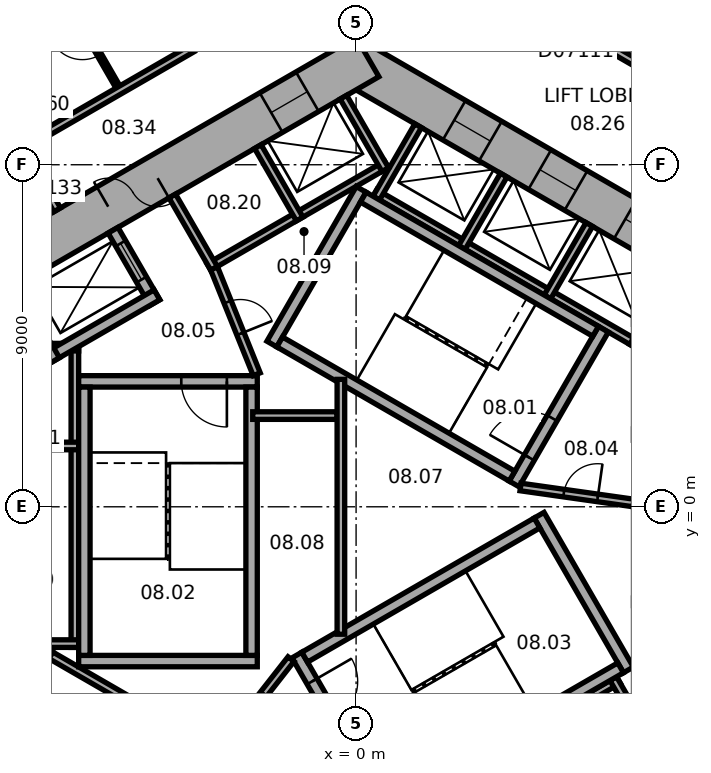
"""IFC4 building model, lengths in metres.
Left out: names, types, materials, properties, quantities, classifications, styles, units other than length and angle.
Written with IfcOpenShell. Run it as: python <this file> out.ifc"""

import sys

from ifc_helpers import new_model, si_unit, direction, frame, frame_2d, origin, place, context, subcontext, project, spatial, rectangle, extrude, element, fill, save


model = new_model("IFC4")
c1 = context("Model", 3, precision=1e-05, world=origin(), true_north=direction((0.0, 1.0)))
c2 = subcontext(c1, "Body", "Model", "MODEL_VIEW")
j1 = project(units=[si_unit("LENGTHUNIT", "METRE"), si_unit("PLANEANGLEUNIT", "RADIAN")], contexts=[c1])
p1 = place(None, origin())
s1 = spatial("IfcSite", under=j1, at=p1, CompositionType="ELEMENT")
p2 = place(p1, origin())
s2 = spatial("IfcBuilding", under=s1, at=p2, CompositionType="ELEMENT")
p3 = place(p2, frame((0.0, 0.0, 47.3)))
s3 = spatial("IfcBuildingStorey", under=s2, at=p3, CompositionType="ELEMENT", Elevation=47.3)
p4 = place(p3, frame((10.4, 5.658, 0.0), z_axis=(0.0, 0.0, 1.0), x_axis=(-0.866021384402, 0.500006961711, 0.0)))
e1 = element("IfcWall", 1, at=p4, inside=s3, PredefinedType="SHEAR", context=c2, shape_type="SweptSolid", body=[
    extrude(rectangle(XDim=12.355, YDim=1.2, at=frame_2d((6.178, 0.0))), origin(), (0.0, 0.0, 1.0), 3.3),
])
p5 = place(p4, frame((2.728, 0.0, 0.0)))
e2 = element("IfcOpeningElement", 2, at=p5, cuts=e1, PredefinedType="OPENING", context=c2, shape_type="SweptSolid", body=[
    extrude(rectangle(XDim=1.1, YDim=2.1, at=frame_2d((0.55, 1.05))), frame((0.0, 0.61, 0.0), z_axis=(0.0, -1.0, 0.0), x_axis=(1.0, 0.0, 0.0)), (0.0, 0.0, 1.0), 1.22),
])
p6 = place(p4, frame((5.328, 0.0, 0.0)))
e3 = element("IfcOpeningElement", 3, at=p6, cuts=e1, PredefinedType="OPENING", context=c2, shape_type="SweptSolid", body=[
    extrude(rectangle(XDim=1.1, YDim=2.1, at=frame_2d((0.55, 1.05))), frame((0.0, 0.61, 0.0), z_axis=(0.0, -1.0, 0.0), x_axis=(1.0, 0.0, 0.0)), (0.0, 0.0, 1.0), 1.22),
])
p7 = place(p4, frame((7.928, 0.0, 0.0)))
e4 = element("IfcOpeningElement", 4, at=p7, cuts=e1, PredefinedType="OPENING", context=c2, shape_type="SweptSolid", body=[
    extrude(rectangle(XDim=1.1, YDim=2.1, at=frame_2d((0.55, 1.05))), frame((0.0, 0.61, 0.0), z_axis=(0.0, -1.0, 0.0), x_axis=(1.0, 0.0, 0.0)), (0.0, 0.0, 1.0), 1.22),
])
p8 = place(p3, frame((0.3, 11.836, 0.0), z_axis=(0.0, 0.0, 1.0), x_axis=(-0.866021384402, -0.500006961711, 0.0)))
e5 = element("IfcWall", 5, at=p8, inside=s3, PredefinedType="SHEAR", context=c2, shape_type="SweptSolid", body=[
    extrude(rectangle(XDim=12.355, YDim=1.2, at=frame_2d((6.178, 0.0))), origin(), (0.0, 0.0, 1.0), 3.3),
])
p9 = place(p8, frame((6.378, 0.0, 0.0)))
e6 = element("IfcOpeningElement", 6, at=p9, cuts=e5, PredefinedType="OPENING", context=c2, shape_type="SweptSolid", body=[
    extrude(rectangle(XDim=1.5, YDim=2.1, at=frame_2d((0.75, 1.05))), frame((0.0, 0.61, 0.0), z_axis=(0.0, -1.0, 0.0), x_axis=(1.0, 0.0, 0.0)), (0.0, 0.0, 1.0), 1.22),
])
p10 = place(p8, frame((1.828, 0.0, 0.0)))
e7 = element("IfcOpeningElement", 7, at=p10, cuts=e5, PredefinedType="OPENING", context=c2, shape_type="SweptSolid", body=[
    extrude(rectangle(XDim=1.1, YDim=2.1, at=frame_2d((0.55, 1.05))), frame((0.0, 0.61, 0.0), z_axis=(0.0, -1.0, 0.0), x_axis=(1.0, 0.0, 0.0)), (0.0, 0.0, 1.0), 1.22),
])
p11 = place(p3, frame((7.424, 4.259, 0.0), z_axis=(0.0, 0.0, 1.0), x_axis=(-0.866026010844, 0.49999894854, 0.0)))
e8 = element("IfcWall", 8, at=p11, inside=s3, PredefinedType="PARTITIONING", context=c2, shape_type="SweptSolid", body=[
    extrude(rectangle(XDim=8.0, YDim=0.2, at=frame_2d((4.0, 0.0))), origin(), (0.0, 0.0, 1.0), 3.05),
])
for number, where, z_axis, x_axis in (
    (9, (7.287, 4.222, 0.0), (0.0, 0.0, 1.0), (0.5, 0.866, 0.0)),
    (10, (5.036, 5.522, 0.0), (0.0, 0.0, 1.0), (0.5, 0.866, 0.0)),
    (11, (2.784, 6.822, 0.0), (0.0, 0.0, 1.0), (0.5, 0.866, 0.0)),
    (12, (0.532, 8.122, 0.0), (0.0, 0.0, 1.0), (0.5, 0.866, 0.0)),
):
    element("IfcWall", number, at=place(p3, frame(where, z_axis=z_axis, x_axis=x_axis)), inside=s3, PredefinedType="PARTITIONING", context=c2, shape_type="SweptSolid", body=[
        extrude(rectangle(XDim=2.2, YDim=0.2, at=frame_2d((1.1, 0.0))), origin(), (0.0, 0.0, 1.0), 3.05),
    ])
p12 = place(p3, frame((0.803, 9.009, 0.0), z_axis=(0.0, 0.0, 1.0), x_axis=(-0.866028230842, -0.499995103361, 0.0)))
e13 = element("IfcWall", 13, at=p12, inside=s3, PredefinedType="PARTITIONING", context=c2, shape_type="SweptSolid", body=[
    extrude(rectangle(XDim=5.4, YDim=0.2, at=frame_2d((2.7, 0.0))), origin(), (0.0, 0.0, 1.0), 3.05),
])
p13 = place(p3, frame((0.767, 8.872, 0.0), z_axis=(0.0, 0.0, 1.0), x_axis=(-0.499994660107, 0.866028486751, 0.0)))
e14 = element("IfcWall", 14, at=p13, inside=s3, PredefinedType="PARTITIONING", context=c2, shape_type="SweptSolid", body=[
    extrude(rectangle(XDim=2.2, YDim=0.2, at=frame_2d((1.1, 0.0))), origin(), (0.0, 0.0, 1.0), 3.05),
])
for number, where, z_axis, x_axis in (
    (15, (-1.485, 7.572, 0.0), (0.0, 0.0, 1.0), (-0.5, 0.866, 0.0)),
    (16, (-3.737, 6.272, 0.0), (0.0, 0.0, 1.0), (-0.5, 0.866, 0.0)),
):
    element("IfcWall", number, at=place(p3, frame(where, z_axis=z_axis, x_axis=x_axis)), inside=s3, PredefinedType="PARTITIONING", context=c2, shape_type="SweptSolid", body=[
        extrude(rectangle(XDim=2.2, YDim=0.2, at=frame_2d((1.1, 0.0))), origin(), (0.0, 0.0, 1.0), 3.05),
    ])
p14 = place(p3, frame((-7.4, 4.3, 0.0), z_axis=(0.0, 0.0, 1.0), x_axis=(0.0, -1.0, 0.0)))
e17 = element("IfcWall", 17, at=p14, inside=s3, PredefinedType="PARTITIONING", context=c2, shape_type="SweptSolid", body=[
    extrude(rectangle(XDim=8.0, YDim=0.2, at=frame_2d((4.0, 0.0))), origin(), (0.0, 0.0, 1.0), 3.05),
])
for number, where, z_axis, x_axis in (
    (18, (-7.3, 4.2, 0.0), (0.0, 0.0, 1.0), (-1.0, 0.0, 0.0)),
    (19, (-7.3, 1.6, 0.0), (0.0, 0.0, 1.0), (-1.0, 0.0, 0.0)),
    (20, (-7.3, -3.6, 0.0), (0.0, 0.0, 1.0), (-1.0, 0.0, 0.0)),
):
    element("IfcWall", number, at=place(p3, frame(where, z_axis=z_axis, x_axis=x_axis)), inside=s3, PredefinedType="PARTITIONING", context=c2, shape_type="SweptSolid", body=[
        extrude(rectangle(XDim=2.2, YDim=0.2, at=frame_2d((1.1, 0.0))), origin(), (0.0, 0.0, 1.0), 3.05),
    ])
p15 = place(p3, frame((-8.203, -3.809, 0.0), z_axis=(0.0, 0.0, 1.0), x_axis=(0.866028230842, -0.499995103361, 0.0)))
e21 = element("IfcWall", 21, at=p15, inside=s3, PredefinedType="PARTITIONING", context=c2, shape_type="SweptSolid", body=[
    extrude(rectangle(XDim=5.4, YDim=0.2, at=frame_2d((2.7, 0.0))), origin(), (0.0, 0.0, 1.0), 3.05),
])
p16 = place(p3, frame((-8.067, -3.772, 0.0), z_axis=(0.0, 0.0, 1.0), x_axis=(-0.50002983664, -0.866008176907, 0.0)))
e22 = element("IfcWall", 22, at=p16, inside=s3, PredefinedType="PARTITIONING", context=c2, shape_type="SweptSolid", body=[
    extrude(rectangle(XDim=2.2, YDim=0.2, at=frame_2d((1.1, 0.0))), origin(), (0.0, 0.0, 1.0), 3.05),
])
p17 = place(p3, frame((-0.024, -8.559, 0.0), z_axis=(0.0, 0.0, 1.0), x_axis=(0.866026010844, 0.49999894854, 0.0)))
e23 = element("IfcWall", 23, at=p17, inside=s3, PredefinedType="PARTITIONING", context=c2, shape_type="SweptSolid", body=[
    extrude(rectangle(XDim=8.0, YDim=0.2, at=frame_2d((4.0, 0.0))), origin(), (0.0, 0.0, 1.0), 3.05),
])
p18 = place(p3, frame((6.768, -4.522, 0.0), z_axis=(0.0, 0.0, 1.0), x_axis=(0.50002983664, -0.866008176907, 0.0)))
e24 = element("IfcWall", 24, at=p18, inside=s3, PredefinedType="PARTITIONING", context=c2, shape_type="SweptSolid", body=[
    extrude(rectangle(XDim=2.2, YDim=0.2, at=frame_2d((1.1, 0.0))), origin(), (0.0, 0.0, 1.0), 3.05),
])
p19 = place(p3, frame((4.158, 0.602, 0.0), z_axis=(0.0, 0.0, 1.0), x_axis=(0.499977259774, 0.866038532462, 0.0)))
e25 = element("IfcWall", 25, at=p19, inside=s3, PredefinedType="SHEAR", context=c2, shape_type="SweptSolid", body=[
    extrude(rectangle(XDim=4.7, YDim=0.3, at=frame_2d((2.35, 0.0))), origin(), (0.0, 0.0, 1.0), 3.05),
])
p20 = place(p19, frame((0.8, 0.0, 0.0)))
e26 = element("IfcOpeningElement", 26, at=p20, cuts=e25, PredefinedType="OPENING", context=c2, shape_type="SweptSolid", body=[
    extrude(rectangle(XDim=1.2, YDim=2.1, at=frame_2d((0.6, 1.05))), frame((0.0, 0.16, 0.0), z_axis=(0.0, -1.0, 0.0), x_axis=(1.0, 0.0, 0.0)), (0.0, 0.0, 1.0), 0.32),
])
p21 = place(p3, frame((-2.216, 4.282, 0.0), z_axis=(0.0, 0.0, 1.0), x_axis=(0.499977259774, 0.866038532462, 0.0)))
e27 = element("IfcWall", 27, at=p21, inside=s3, PredefinedType="SHEAR", context=c2, shape_type="SweptSolid", body=[
    extrude(rectangle(XDim=4.7, YDim=0.3, at=frame_2d((2.35, 0.0))), origin(), (0.0, 0.0, 1.0), 3.05),
])
for number, where, z_axis, x_axis in (
    (28, (4.103, 0.807, 0.0), (0.0, 0.0, 1.0), (-0.866, 0.5, 0.0)),
    (29, (6.303, 4.617, 0.0), (0.0, 0.0, 1.0), (-0.866, 0.5, 0.0)),
):
    element("IfcWall", number, at=place(p3, frame(where, z_axis=z_axis, x_axis=x_axis)), inside=s3, PredefinedType="SHEAR", context=c2, shape_type="SweptSolid", body=[
        extrude(rectangle(XDim=7.06, YDim=0.3, at=frame_2d((3.53, 0.0))), origin(), (0.0, 0.0, 1.0), 3.05),
    ])
p22 = place(p3, frame((-2.6, 3.3, 0.0), z_axis=(0.0, 0.0, 1.0), x_axis=(-1.0, 0.0, 0.0)))
e30 = element("IfcWall", 30, at=p22, inside=s3, PredefinedType="SHEAR", context=c2, shape_type="SweptSolid", body=[
    extrude(rectangle(XDim=4.7, YDim=0.3, at=frame_2d((2.35, 0.0))), origin(), (0.0, 0.0, 1.0), 3.05),
])
p23 = place(p22, frame((0.8, 0.0, 0.0)))
e31 = element("IfcOpeningElement", 31, at=p23, cuts=e30, PredefinedType="OPENING", context=c2, shape_type="SweptSolid", body=[
    extrude(rectangle(XDim=1.2, YDim=2.1, at=frame_2d((0.6, 1.05))), frame((0.0, 0.16, 0.0), z_axis=(0.0, -1.0, 0.0), x_axis=(1.0, 0.0, 0.0)), (0.0, 0.0, 1.0), 0.32),
])
p24 = place(p3, frame((-2.6, -4.06, 0.0), z_axis=(0.0, 0.0, 1.0), x_axis=(-1.0, 0.0, 0.0)))
e32 = element("IfcWall", 32, at=p24, inside=s3, PredefinedType="SHEAR", context=c2, shape_type="SweptSolid", body=[
    extrude(rectangle(XDim=4.7, YDim=0.3, at=frame_2d((2.35, 0.0))), origin(), (0.0, 0.0, 1.0), 3.05),
])
for number, where, z_axis, x_axis in (
    (33, (-2.75, 3.15, 0.0), (0.0, 0.0, 1.0), (0.0, -1.0, 0.0)),
    (34, (-7.15, 3.15, 0.0), (0.0, 0.0, 1.0), (0.0, -1.0, 0.0)),
):
    element("IfcWall", number, at=place(p3, frame(where, z_axis=z_axis, x_axis=x_axis)), inside=s3, PredefinedType="SHEAR", context=c2, shape_type="SweptSolid", body=[
        extrude(rectangle(XDim=7.06, YDim=0.3, at=frame_2d((3.53, 0.0))), origin(), (0.0, 0.0, 1.0), 3.05),
    ])
p25 = place(p3, frame((-1.558, -3.902, 0.0), z_axis=(0.0, 0.0, 1.0), x_axis=(0.499977259774, -0.866038532462, 0.0)))
e35 = element("IfcWall", 35, at=p25, inside=s3, PredefinedType="SHEAR", context=c2, shape_type="SweptSolid", body=[
    extrude(rectangle(XDim=4.7, YDim=0.3, at=frame_2d((2.35, 0.0))), origin(), (0.0, 0.0, 1.0), 3.05),
])
p26 = place(p25, frame((0.8, 0.0, 0.0)))
e36 = element("IfcOpeningElement", 36, at=p26, cuts=e35, PredefinedType="OPENING", context=c2, shape_type="SweptSolid", body=[
    extrude(rectangle(XDim=1.2, YDim=2.1, at=frame_2d((0.6, 1.05))), frame((0.0, 0.16, 0.0), z_axis=(0.0, -1.0, 0.0), x_axis=(1.0, 0.0, 0.0)), (0.0, 0.0, 1.0), 0.32),
])
p27 = place(p3, frame((4.816, -0.222, 0.0), z_axis=(0.0, 0.0, 1.0), x_axis=(0.499977259774, -0.866038532462, 0.0)))
e37 = element("IfcWall", 37, at=p27, inside=s3, PredefinedType="SHEAR", context=c2, shape_type="SweptSolid", body=[
    extrude(rectangle(XDim=4.7, YDim=0.3, at=frame_2d((2.35, 0.0))), origin(), (0.0, 0.0, 1.0), 3.05),
])
for number, where, z_axis, x_axis in (
    (38, (-1.353, -3.957, 0.0), (0.0, 0.0, 1.0), (0.866, 0.5, 0.0)),
    (39, (0.847, -7.767, 0.0), (0.0, 0.0, 1.0), (0.866, 0.5, 0.0)),
):
    element("IfcWall", number, at=place(p3, frame(where, z_axis=z_axis, x_axis=x_axis)), inside=s3, PredefinedType="SHEAR", context=c2, shape_type="SweptSolid", body=[
        extrude(rectangle(XDim=7.06, YDim=0.3, at=frame_2d((3.53, 0.0))), origin(), (0.0, 0.0, 1.0), 3.05),
    ])
p28 = place(p3, frame((4.327, 0.521, 0.0), z_axis=(0.0, 0.0, 1.0), x_axis=(0.990124376366, -0.14019172346, 0.0)))
e40 = element("IfcWall", 40, at=p28, inside=s3, PredefinedType="PARTITIONING", context=c2, shape_type="SweptSolid", body=[
    extrude(rectangle(XDim=3.002, YDim=0.2, at=frame_2d((1.501, 0.0))), origin(), (0.0, 0.0, 1.0), 3.05),
])
p29 = place(p28, frame((1.15, 0.0, 0.0)))
e41 = element("IfcOpeningElement", 41, at=p29, cuts=e40, PredefinedType="OPENING", context=c2, shape_type="SweptSolid", body=[
    extrude(rectangle(XDim=0.9, YDim=2.1, at=frame_2d((0.45, 1.05))), frame((0.0, 0.11, 0.0), z_axis=(0.0, -1.0, 0.0), x_axis=(1.0, 0.0, 0.0)), (0.0, 0.0, 1.0), 0.22),
])
p30 = place(p3, frame((-5.295, 5.372, 0.0), z_axis=(0.0, 0.0, 1.0), x_axis=(-0.500077893725, 0.86598042715, 0.0)))
e42 = element("IfcWall", 42, at=p30, inside=s3, PredefinedType="SHEAR", context=c2, shape_type="SweptSolid", body=[
    extrude(rectangle(XDim=2.2, YDim=0.3, at=frame_2d((1.1, 0.0))), origin(), (0.0, 0.0, 1.0), 3.05),
])
p31 = place(p30, frame((0.7, 0.0, 0.0)))
e43 = element("IfcOpeningElement", 43, at=p31, cuts=e42, PredefinedType="OPENING", context=c2, shape_type="SweptSolid", body=[
    extrude(rectangle(XDim=1.1, YDim=2.1, at=frame_2d((0.55, 1.05))), frame((0.0, 0.16, 0.0), z_axis=(0.0, -1.0, 0.0), x_axis=(1.0, 0.0, 0.0)), (0.0, 0.0, 1.0), 0.32),
])
p32 = place(p3, frame((-5.24, 5.577, 0.0), z_axis=(0.0, 0.0, 1.0), x_axis=(-0.866014461049, -0.500018952895, 0.0)))
e44 = element("IfcWall", 44, at=p32, inside=s3, PredefinedType="SHEAR", context=c2, shape_type="SweptSolid", body=[
    extrude(rectangle(XDim=3.35, YDim=0.3, at=frame_2d((1.675, 0.0))), origin(), (0.0, 0.0, 1.0), 3.05),
])
p33 = place(p3, frame((-7.937, 3.847, 0.0), z_axis=(0.0, 0.0, 1.0), x_axis=(-0.50002983664, 0.866008176907, 0.0)))
e45 = element("IfcWall", 45, at=p33, inside=s3, PredefinedType="SHEAR", context=c2, shape_type="SweptSolid", body=[
    extrude(rectangle(XDim=2.2, YDim=0.3, at=frame_2d((1.1, 0.0))), origin(), (0.0, 0.0, 1.0), 3.05),
])
p34 = place(p3, frame((-2.615, 3.487, 0.0), z_axis=(0.0, 0.0, 1.0), x_axis=(-0.373576831041, 0.92759924068, 0.0)))
e46 = element("IfcWall", 46, at=p34, inside=s3, PredefinedType="PARTITIONING", context=c2, shape_type="SweptSolid", body=[
    extrude(rectangle(XDim=3.002, YDim=0.2, at=frame_2d((1.501, 0.0))), origin(), (0.0, 0.0, 1.0), 3.05),
])
p35 = place(p34, frame((1.15, 0.0, 0.0)))
e47 = element("IfcOpeningElement", 47, at=p35, cuts=e46, PredefinedType="OPENING", context=c2, shape_type="SweptSolid", body=[
    extrude(rectangle(XDim=0.9, YDim=2.1, at=frame_2d((0.45, 1.05))), frame((0.0, 0.11, 0.0), z_axis=(0.0, -1.0, 0.0), x_axis=(1.0, 0.0, 0.0)), (0.0, 0.0, 1.0), 0.22),
])
p36 = place(p3, frame((-1.712, -4.008, 0.0), z_axis=(0.0, 0.0, 1.0), x_axis=(-0.616549420702, -0.787316208287, 0.0)))
e48 = element("IfcWall", 48, at=p36, inside=s3, PredefinedType="PARTITIONING", context=c2, shape_type="SweptSolid", body=[
    extrude(rectangle(XDim=3.002, YDim=0.2, at=frame_2d((1.501, 0.0))), origin(), (0.0, 0.0, 1.0), 3.05),
])
p37 = place(p36, frame((1.15, 0.0, 0.0)))
e49 = element("IfcOpeningElement", 49, at=p37, cuts=e48, PredefinedType="OPENING", context=c2, shape_type="SweptSolid", body=[
    extrude(rectangle(XDim=0.9, YDim=2.1, at=frame_2d((0.45, 1.05))), frame((0.0, 0.11, 0.0), z_axis=(0.0, -1.0, 0.0), x_axis=(1.0, 0.0, 0.0)), (0.0, 0.0, 1.0), 0.22),
])
p38 = place(p3, frame((-2.72, 2.4, 0.0), z_axis=(0.0, 0.0, 1.0), x_axis=(1.0, 0.0, 0.0)))
e50 = element("IfcWall", 50, at=p38, inside=s3, PredefinedType="PARTITIONING", context=c2, shape_type="SweptSolid", body=[
    extrude(rectangle(XDim=2.22, YDim=0.2, at=frame_2d((1.11, 0.0))), origin(), (0.0, 0.0, 1.0), 3.05),
])
p39 = place(p3, frame((-0.4, -3.353, 0.0), z_axis=(0.0, 0.0, 1.0), x_axis=(0.0, 1.0, 0.0)))
e51 = element("IfcWall", 51, at=p39, inside=s3, PredefinedType="PARTITIONING", context=c2, shape_type="SweptSolid", body=[
    extrude(rectangle(XDim=6.707, YDim=0.2, at=frame_2d((3.353, 0.0))), origin(), (0.0, 0.0, 1.0), 3.05),
])
p40 = place(p3, frame((-7.865, 7.814, 0.0), z_axis=(0.0, 0.0, 1.0), x_axis=(-0.500004234368, 0.866022959057, 0.0)))
e52 = element("IfcWall", 52, at=p40, inside=s3, PredefinedType="PARTITIONING", context=c2, shape_type="SweptSolid", body=[
    extrude(rectangle(XDim=11.25, YDim=0.2, at=frame_2d((5.625, 0.0))), origin(), (0.0, 0.0, 1.0), 3.05),
])
p41 = place(p40, frame((0.5, 0.0, 0.0)))
e53 = element("IfcOpeningElement", 53, at=p41, cuts=e52, PredefinedType="OPENING", context=c2, shape_type="SweptSolid", body=[
    extrude(rectangle(XDim=0.9, YDim=2.1, at=frame_2d((0.45, 1.05))), frame((0.0, 0.11, 0.0), z_axis=(0.0, -1.0, 0.0), x_axis=(1.0, 0.0, 0.0)), (0.0, 0.0, 1.0), 0.22),
])
p42 = place(p3, frame((-7.687, 13.506, 0.0), z_axis=(0.0, 0.0, 1.0), x_axis=(0.499985389037, -0.866033839264, 0.0)))
e54 = element("IfcWall", 54, at=p42, inside=s3, PredefinedType="PARTITIONING", context=c2, shape_type="SweptSolid", body=[
    extrude(rectangle(XDim=2.84, YDim=0.12, at=frame_2d((1.42, 0.0))), origin(), (0.0, 0.0, 1.0), 2.6),
])
p43 = place(p42, frame((0.97, 0.0, 0.0)))
e55 = element("IfcOpeningElement", 55, at=p43, cuts=e54, PredefinedType="OPENING", context=c2, shape_type="SweptSolid", body=[
    extrude(rectangle(XDim=0.9, YDim=2.1, at=frame_2d((0.45, 1.05))), frame((0.0, 0.07, 0.0), z_axis=(0.0, -1.0, 0.0), x_axis=(1.0, 0.0, 0.0)), (0.0, 0.0, 1.0), 0.14),
])
p44 = place(p3, frame((-4.309, 12.061, 0.0), z_axis=(0.0, 0.0, 1.0), x_axis=(-0.866020679205, -0.500008183122, 0.0)))
e56 = element("IfcWall", 56, at=p44, inside=s3, PredefinedType="PARTITIONING", context=c2, shape_type="SweptSolid", body=[
    extrude(rectangle(XDim=5.104, YDim=0.2, at=frame_2d((2.552, 0.0))), origin(), (0.0, 0.0, 1.0), 3.05),
])
p45 = place(p3, frame((10.885, 9.652, 0.0), z_axis=(0.0, 0.0, 1.0), x_axis=(-0.866033868542, 0.499985338323, 0.0)))
e57 = element("IfcWall", 57, at=p45, inside=s3, PredefinedType="PARTITIONING", context=c2, shape_type="SweptSolid", body=[
    extrude(rectangle(XDim=8.602, YDim=0.2, at=frame_2d((4.301, 0.0))), origin(), (0.0, 0.0, 1.0), 3.05),
])
p46 = place(p45, frame((5.069, 0.0, 0.0)))
e58 = element("IfcOpeningElement", 58, at=p46, cuts=e57, PredefinedType="OPENING", context=c2, shape_type="SweptSolid", body=[
    extrude(rectangle(XDim=1.0, YDim=2.1, at=frame_2d((0.5, 1.05))), frame((0.0, 0.11, 0.0), z_axis=(0.0, -1.0, 0.0), x_axis=(1.0, 0.0, 0.0)), (0.0, 0.0, 1.0), 0.22),
])
p47 = place(p9, origin())
e59 = element("IfcDoor", 59, at=p47, inside=s3, OperationType="DOUBLE_DOOR_SINGLE_SWING", PredefinedType="DOOR", context=c2, shape_type="SweptSolid", body=[
    extrude(rectangle(XDim=1.5, YDim=2.1, at=frame_2d((0.75, 1.05))), frame((0.0, 0.025, 0.0), z_axis=(0.0, -1.0, 0.0), x_axis=(1.0, 0.0, 0.0)), (0.0, 0.0, 1.0), 0.05),
])
fill(e6, e59)
p48 = place(p20, origin())
e60 = element("IfcDoor", 60, at=p48, inside=s3, OperationType="SINGLE_SWING_RIGHT", PredefinedType="DOOR", context=c2, shape_type="SweptSolid", body=[
    extrude(rectangle(XDim=1.2, YDim=2.1, at=frame_2d((0.6, 1.05))), frame((0.0, 0.025, 0.0), z_axis=(0.0, -1.0, 0.0), x_axis=(1.0, 0.0, 0.0)), (0.0, 0.0, 1.0), 0.05),
])
fill(e26, e60)
p49 = place(p23, origin())
e61 = element("IfcDoor", 61, at=p49, inside=s3, OperationType="SINGLE_SWING_RIGHT", PredefinedType="DOOR", context=c2, shape_type="SweptSolid", body=[
    extrude(rectangle(XDim=1.2, YDim=2.1, at=frame_2d((0.6, 1.05))), frame((0.0, 0.025, 0.0), z_axis=(0.0, -1.0, 0.0), x_axis=(1.0, 0.0, 0.0)), (0.0, 0.0, 1.0), 0.05),
])
fill(e31, e61)
p50 = place(p26, origin())
e62 = element("IfcDoor", 62, at=p50, inside=s3, OperationType="SINGLE_SWING_RIGHT", PredefinedType="DOOR", context=c2, shape_type="SweptSolid", body=[
    extrude(rectangle(XDim=1.2, YDim=2.1, at=frame_2d((0.6, 1.05))), frame((0.0, 0.025, 0.0), z_axis=(0.0, -1.0, 0.0), x_axis=(1.0, 0.0, 0.0)), (0.0, 0.0, 1.0), 0.05),
])
fill(e36, e62)
p51 = place(p29, origin())
e63 = element("IfcDoor", 63, at=p51, inside=s3, OperationType="SINGLE_SWING_LEFT", PredefinedType="DOOR", context=c2, shape_type="SweptSolid", body=[
    extrude(rectangle(XDim=0.9, YDim=2.1, at=frame_2d((0.45, 1.05))), frame((0.0, 0.025, 0.0), z_axis=(0.0, -1.0, 0.0), x_axis=(1.0, 0.0, 0.0)), (0.0, 0.0, 1.0), 0.05),
])
fill(e41, e63)
p52 = place(p35, origin())
e64 = element("IfcDoor", 64, at=p52, inside=s3, OperationType="SINGLE_SWING_LEFT", PredefinedType="DOOR", context=c2, shape_type="SweptSolid", body=[
    extrude(rectangle(XDim=0.9, YDim=2.1, at=frame_2d((0.45, 1.05))), frame((0.0, 0.025, 0.0), z_axis=(0.0, -1.0, 0.0), x_axis=(1.0, 0.0, 0.0)), (0.0, 0.0, 1.0), 0.05),
])
fill(e47, e64)
p53 = place(p37, origin())
e65 = element("IfcDoor", 65, at=p53, inside=s3, OperationType="SINGLE_SWING_LEFT", PredefinedType="DOOR", context=c2, shape_type="SweptSolid", body=[
    extrude(rectangle(XDim=0.9, YDim=2.1, at=frame_2d((0.45, 1.05))), frame((0.0, 0.025, 0.0), z_axis=(0.0, -1.0, 0.0), x_axis=(1.0, 0.0, 0.0)), (0.0, 0.0, 1.0), 0.05),
])
fill(e49, e65)
p54 = place(p31, origin())
e66 = element("IfcDoor", 66, at=p54, inside=s3, OperationType="DOUBLE_DOOR_SLIDING", PredefinedType="DOOR", context=c2, shape_type="SweptSolid", body=[
    extrude(rectangle(XDim=1.1, YDim=2.1, at=frame_2d((0.55, 1.05))), frame((0.0, 0.025, 0.0), z_axis=(0.0, -1.0, 0.0), x_axis=(1.0, 0.0, 0.0)), (0.0, 0.0, 1.0), 0.05),
])
fill(e43, e66)
p55 = place(p5, origin())
e67 = element("IfcDoor", 67, at=p55, inside=s3, OperationType="DOUBLE_DOOR_SLIDING", PredefinedType="DOOR", context=c2, shape_type="SweptSolid", body=[
    extrude(rectangle(XDim=1.1, YDim=2.1, at=frame_2d((0.55, 1.05))), frame((0.0, 0.025, 0.0), z_axis=(0.0, -1.0, 0.0), x_axis=(1.0, 0.0, 0.0)), (0.0, 0.0, 1.0), 0.05),
])
fill(e2, e67)
p56 = place(p6, origin())
e68 = element("IfcDoor", 68, at=p56, inside=s3, OperationType="DOUBLE_DOOR_SLIDING", PredefinedType="DOOR", context=c2, shape_type="SweptSolid", body=[
    extrude(rectangle(XDim=1.1, YDim=2.1, at=frame_2d((0.55, 1.05))), frame((0.0, 0.025, 0.0), z_axis=(0.0, -1.0, 0.0), x_axis=(1.0, 0.0, 0.0)), (0.0, 0.0, 1.0), 0.05),
])
fill(e3, e68)
p57 = place(p7, origin())
e69 = element("IfcDoor", 69, at=p57, inside=s3, OperationType="DOUBLE_DOOR_SLIDING", PredefinedType="DOOR", context=c2, shape_type="SweptSolid", body=[
    extrude(rectangle(XDim=1.1, YDim=2.1, at=frame_2d((0.55, 1.05))), frame((0.0, 0.025, 0.0), z_axis=(0.0, -1.0, 0.0), x_axis=(1.0, 0.0, 0.0)), (0.0, 0.0, 1.0), 0.05),
])
fill(e4, e69)
p58 = place(p10, origin())
e70 = element("IfcDoor", 70, at=p58, inside=s3, OperationType="DOUBLE_DOOR_SLIDING", PredefinedType="DOOR", context=c2, shape_type="SweptSolid", body=[
    extrude(rectangle(XDim=1.1, YDim=2.1, at=frame_2d((0.55, 1.05))), frame((0.0, 0.025, 0.0), z_axis=(0.0, -1.0, 0.0), x_axis=(1.0, 0.0, 0.0)), (0.0, 0.0, 1.0), 0.05),
])
fill(e7, e70)
p59 = place(p43, origin())
e71 = element("IfcDoor", 71, at=p59, inside=s3, OperationType="SINGLE_SWING_LEFT", PredefinedType="DOOR", context=c2, shape_type="SweptSolid", body=[
    extrude(rectangle(XDim=0.9, YDim=2.1, at=frame_2d((0.45, 1.05))), frame((0.0, 0.025, 0.0), z_axis=(0.0, -1.0, 0.0), x_axis=(1.0, 0.0, 0.0)), (0.0, 0.0, 1.0), 0.05),
])
fill(e55, e71)
save(model, sys.argv[1])
